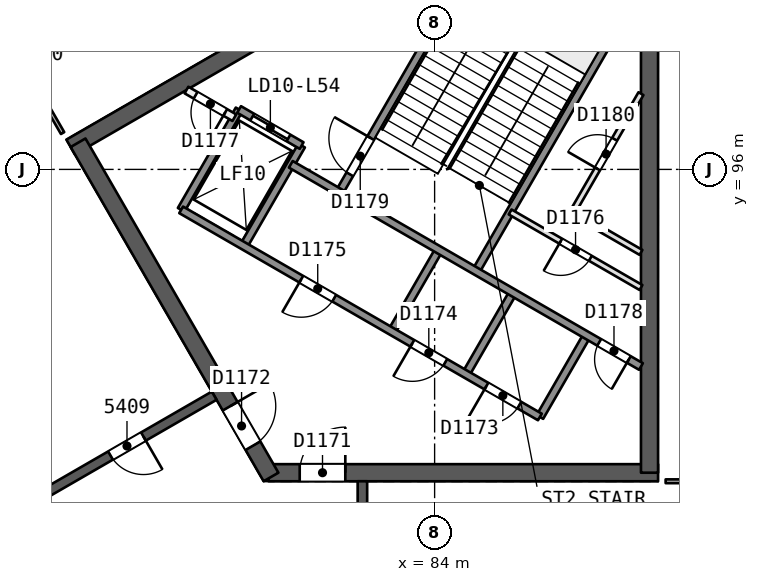
"""IFC4 building model, lengths in metres.
Left out: names, types, materials, properties, quantities, classifications, styles, units other than length and angle.
Written with IfcOpenShell. Run it as: python <this file> out.ifc"""

import sys

from ifc_helpers import new_model, si_unit, direction, frame, frame_2d, origin, place, context, subcontext, project, spatial, rectangle, extrude, element, fill, save


model = new_model("IFC4")
c1 = context("Model", 3, precision=1e-05, world=origin(), true_north=direction((0.0, 1.0)))
c2 = subcontext(c1, "Body", "Model", "MODEL_VIEW")
j1 = project(units=[si_unit("LENGTHUNIT", "METRE"), si_unit("PLANEANGLEUNIT", "RADIAN")], contexts=[c1])
p1 = place(None, origin())
s1 = spatial("IfcSite", under=j1, at=p1, CompositionType="ELEMENT")
p2 = place(p1, origin())
s2 = spatial("IfcBuilding", under=s1, at=p2, CompositionType="ELEMENT")
p3 = place(p2, frame((0.0, 0.0, 220.6)))
s3 = spatial("IfcBuildingStorey", under=s2, at=p3, CompositionType="ELEMENT", Elevation=220.6)
p4 = place(p3, frame((79.63, 88.019, 0.0), z_axis=(0.0, 0.0, 1.0), x_axis=(1.0, 0.0, 0.0)))
e1 = element("IfcWall", 1, at=p4, inside=s3, PredefinedType="SHEAR", context=c2, shape_type="SweptSolid", body=[
    extrude(rectangle(XDim=10.25, YDim=0.45, at=frame_2d((5.125, 0.0))), origin(), (0.0, 0.0, 1.0), 3.7),
])
p5 = place(p4, frame((0.82, 0.0, 0.0)))
e2 = element("IfcOpeningElement", 2, at=p5, cuts=e1, PredefinedType="OPENING", context=c2, shape_type="SweptSolid", body=[
    extrude(rectangle(XDim=1.2, YDim=2.1, at=frame_2d((0.6, 1.05))), frame((0.0, 0.235, 0.0), z_axis=(0.0, -1.0, 0.0), x_axis=(1.0, 0.0, 0.0)), (0.0, 0.0, 1.0), 0.471),
])
p6 = place(p3, frame((89.655, 88.019, 0.0), z_axis=(0.0, 0.0, 1.0), x_axis=(0.0, 1.0, 0.0)))
e3 = element("IfcWall", 3, at=p6, inside=s3, PredefinedType="SHEAR", context=c2, shape_type="SweptSolid", body=[
    extrude(rectangle(XDim=14.108, YDim=0.45, at=frame_2d((7.054, 0.0))), origin(), (0.0, 0.0, 1.0), 3.7),
])
p7 = place(p3, frame((86.723, 103.69, 0.0), z_axis=(0.0, 0.0, 1.0), x_axis=(-0.866022713978, -0.500004658852, 0.0)))
e4 = element("IfcWall", 4, at=p7, inside=s3, PredefinedType="SHEAR", context=c2, shape_type="SweptSolid", body=[
    extrude(rectangle(XDim=14.203, YDim=0.45, at=frame_2d((7.102, 0.0))), origin(), (0.0, 0.0, 1.0), 3.7),
])
p8 = place(p3, frame((74.617, 96.701, 0.0), z_axis=(0.0, 0.0, 1.0), x_axis=(0.499994385119, -0.866028645513, 0.0)))
e5 = element("IfcWall", 5, at=p8, inside=s3, PredefinedType="SHEAR", context=c2, shape_type="SweptSolid", body=[
    extrude(rectangle(XDim=10.155, YDim=0.45, at=frame_2d((5.077, 0.0))), origin(), (0.0, 0.0, 1.0), 3.7),
])
p9 = place(p8, frame((8.005, 0.0, 0.0)))
e6 = element("IfcOpeningElement", 6, at=p9, cuts=e5, PredefinedType="OPENING", context=c2, shape_type="SweptSolid", body=[
    extrude(rectangle(XDim=1.2, YDim=2.1, at=frame_2d((0.6, 1.05))), frame((0.0, 0.235, 0.0), z_axis=(0.0, -1.0, 0.0), x_axis=(1.0, 0.0, 0.0)), (0.0, 0.0, 1.0), 0.471),
])
p10 = place(p3, frame((82.1, 72.206, 0.0), z_axis=(0.0, 0.0, 1.0), x_axis=(0.0, 1.0, 0.0)))
e7 = element("IfcWall", 7, at=p10, inside=s3, PredefinedType="SHEAR", context=c2, shape_type="SweptSolid", body=[
    extrude(rectangle(XDim=15.588, YDim=0.25, at=frame_2d((7.794, 0.0))), origin(), (0.0, 0.0, 1.0), 3.3),
])
p11 = place(p10, frame((2.15, 0.0, 0.0)))
e8 = element("IfcOpeningElement", 8, at=p11, cuts=e7, PredefinedType="OPENING", context=c2, shape_type="SweptSolid", body=[
    extrude(rectangle(XDim=1.0, YDim=2.1, at=frame_2d((0.5, 1.05))), frame((0.0, 0.135, 0.0), z_axis=(0.0, -1.0, 0.0), x_axis=(1.0, 0.0, 0.0)), (0.0, 0.0, 1.0), 0.271),
])
p12 = place(p10, frame((8.75, 0.0, 0.0)))
e9 = element("IfcOpeningElement", 9, at=p12, cuts=e7, PredefinedType="OPENING", context=c2, shape_type="SweptSolid", body=[
    extrude(rectangle(XDim=1.0, YDim=2.1, at=frame_2d((0.5, 1.05))), frame((0.0, 0.135, 0.0), z_axis=(0.0, -1.0, 0.0), x_axis=(1.0, 0.0, 0.0)), (0.0, 0.0, 1.0), 0.271),
])
p13 = place(p10, frame((12.594, 0.0, 0.0)))
e10 = element("IfcOpeningElement", 10, at=p13, cuts=e7, PredefinedType="OPENING", context=c2, shape_type="SweptSolid", body=[
    extrude(rectangle(XDim=1.0, YDim=2.1, at=frame_2d((0.5, 1.05))), frame((0.0, 0.135, 0.0), z_axis=(0.0, -1.0, 0.0), x_axis=(1.0, 0.0, 0.0)), (0.0, 0.0, 1.0), 0.271),
])
p14 = place(p3, frame((78.2, 90.046, 0.0), z_axis=(0.0, 0.0, 1.0), x_axis=(-0.866026492143, -0.499998114903, 0.0)))
e11 = element("IfcWall", 11, at=p14, inside=s3, PredefinedType="SHEAR", context=c2, shape_type="SweptSolid", body=[
    extrude(rectangle(XDim=15.588, YDim=0.25, at=frame_2d((7.794, 0.0))), origin(), (0.0, 0.0, 1.0), 3.3),
])
p15 = place(p14, frame((2.15, 0.0, 0.0)))
e12 = element("IfcOpeningElement", 12, at=p15, cuts=e11, PredefinedType="OPENING", context=c2, shape_type="SweptSolid", body=[
    extrude(rectangle(XDim=1.0, YDim=2.1, at=frame_2d((0.5, 1.05))), frame((0.0, 0.135, 0.0), z_axis=(0.0, -1.0, 0.0), x_axis=(1.0, 0.0, 0.0)), (0.0, 0.0, 1.0), 0.271),
])
p16 = place(p14, frame((8.538, 0.0, 0.0)))
e13 = element("IfcOpeningElement", 13, at=p16, cuts=e11, PredefinedType="OPENING", context=c2, shape_type="SweptSolid", body=[
    extrude(rectangle(XDim=1.1, YDim=2.1, at=frame_2d((0.55, 1.05))), frame((0.0, 0.135, 0.0), z_axis=(0.0, -1.0, 0.0), x_axis=(1.0, 0.0, 0.0)), (0.0, 0.0, 1.0), 0.271),
])
p17 = place(p14, frame((12.282, 0.0, 0.0)))
e14 = element("IfcOpeningElement", 14, at=p17, cuts=e11, PredefinedType="OPENING", context=c2, shape_type="SweptSolid", body=[
    extrude(rectangle(XDim=1.0, YDim=2.1, at=frame_2d((0.5, 1.05))), frame((0.0, 0.135, 0.0), z_axis=(0.0, -1.0, 0.0), x_axis=(1.0, 0.0, 0.0)), (0.0, 0.0, 1.0), 0.271),
])
p18 = place(p3, frame((92.503, 87.794, 0.0), z_axis=(0.0, 0.0, 1.0), x_axis=(-1.0, 0.0, 0.0)))
e15 = element("IfcWall", 15, at=p18, inside=s3, PredefinedType="PARTITIONING", context=c2, shape_type="SweptSolid", body=[
    extrude(rectangle(XDim=2.424, YDim=0.1, at=frame_2d((1.212, 0.0))), origin(), (0.0, 0.0, 1.0), 3.3),
])
p19 = place(p18, frame((0.762, 0.0, 0.0)))
e16 = element("IfcOpeningElement", 16, at=p19, cuts=e15, PredefinedType="OPENING", context=c2, shape_type="SweptSolid", body=[
    extrude(rectangle(XDim=0.9, YDim=2.1, at=frame_2d((0.45, 1.05))), frame((0.0, 0.061, 0.0), z_axis=(0.0, -1.0, 0.0), x_axis=(1.0, 0.0, 0.0)), (0.0, 0.0, 1.0), 0.121),
])
p20 = place(p3, frame((74.21, 96.956, 0.0), z_axis=(0.0, 0.0, 1.0), x_axis=(-0.49995203611, 0.866053093978, 0.0)))
e17 = element("IfcWall", 17, at=p20, inside=s3, PredefinedType="PARTITIONING", context=c2, shape_type="SweptSolid", body=[
    extrude(rectangle(XDim=2.424, YDim=0.1, at=frame_2d((1.212, 0.0))), origin(), (0.0, 0.0, 1.0), 3.3),
])
p21 = place(p20, frame((0.762, 0.0, 0.0)))
e18 = element("IfcOpeningElement", 18, at=p21, cuts=e17, PredefinedType="OPENING", context=c2, shape_type="SweptSolid", body=[
    extrude(rectangle(XDim=0.9, YDim=2.1, at=frame_2d((0.45, 1.05))), frame((0.0, 0.061, 0.0), z_axis=(0.0, -1.0, 0.0), x_axis=(1.0, 0.0, 0.0)), (0.0, 0.0, 1.0), 0.121),
])
p22 = place(p3, frame((44.193, 82.596, 0.0), z_axis=(0.0, 0.0, 1.0), x_axis=(0.866024521231, 0.500001528624, 0.0)))
e19 = element("IfcWall", 19, at=p22, inside=s3, PredefinedType="SOLIDWALL", context=c2, shape_type="SweptSolid", body=[
    extrude(rectangle(XDim=50.762, YDim=0.3, at=frame_2d((25.381, 0.0))), origin(), (0.0, 0.0, 1.0), 3.3),
])
p23 = place(p22, frame((24.337, 0.0, 0.0)))
e20 = element("IfcOpeningElement", 20, at=p23, cuts=e19, PredefinedType="OPENING", context=c2, shape_type="SweptSolid", body=[
    extrude(rectangle(XDim=2.4, YDim=2.4, at=frame_2d((1.2, 1.2))), frame((0.0, 0.161, 0.0), z_axis=(0.0, -1.0, 0.0), x_axis=(1.0, 0.0, 0.0)), (0.0, 0.0, 1.0), 0.321),
])
p24 = place(p22, frame((29.325, 0.0, 0.0)))
e21 = element("IfcOpeningElement", 21, at=p24, cuts=e19, PredefinedType="OPENING", context=c2, shape_type="SweptSolid", body=[
    extrude(rectangle(XDim=2.4, YDim=2.4, at=frame_2d((1.2, 1.2))), frame((0.0, 0.161, 0.0), z_axis=(0.0, -1.0, 0.0), x_axis=(1.0, 0.0, 0.0)), (0.0, 0.0, 1.0), 0.321),
])
p25 = place(p22, frame((39.492, 0.0, 0.0)))
e22 = element("IfcOpeningElement", 22, at=p25, cuts=e19, PredefinedType="OPENING", context=c2, shape_type="SweptSolid", body=[
    extrude(rectangle(XDim=2.4, YDim=2.4, at=frame_2d((1.2, 1.2))), frame((0.0, 0.161, 0.0), z_axis=(0.0, -1.0, 0.0), x_axis=(1.0, 0.0, 0.0)), (0.0, 0.0, 1.0), 0.321),
])
p26 = place(p22, frame((19.193, 0.0, 0.0)))
e23 = element("IfcOpeningElement", 23, at=p26, cuts=e19, PredefinedType="OPENING", context=c2, shape_type="SweptSolid", body=[
    extrude(rectangle(XDim=2.4, YDim=2.4, at=frame_2d((1.2, 1.2))), frame((0.0, 0.161, 0.0), z_axis=(0.0, -1.0, 0.0), x_axis=(1.0, 0.0, 0.0)), (0.0, 0.0, 1.0), 0.321),
])
p27 = place(p22, frame((8.878, 0.0, 0.0)))
e24 = element("IfcOpeningElement", 24, at=p27, cuts=e19, PredefinedType="OPENING", context=c2, shape_type="SweptSolid", body=[
    extrude(rectangle(XDim=2.4, YDim=2.4, at=frame_2d((1.2, 1.2))), frame((0.0, 0.161, 0.0), z_axis=(0.0, -1.0, 0.0), x_axis=(1.0, 0.0, 0.0)), (0.0, 0.0, 1.0), 0.321),
])
p28 = place(p3, frame((86.77, 89.486, 0.0), z_axis=(0.0, 0.0, 1.0), x_axis=(0.499961042966, 0.86604789447, 0.0)))
e25 = element("IfcWall", 25, at=p28, inside=s3, PredefinedType="SOLIDWALL", context=c2, shape_type="SweptSolid", body=[
    extrude(rectangle(XDim=2.48, YDim=0.2, at=frame_2d((1.24, 0.0))), origin(), (0.0, 0.0, 1.0), 3.3),
])
p29 = place(p3, frame((87.621, 94.86, 0.0), z_axis=(0.0, 0.0, 1.0), x_axis=(0.499993116331, 0.866029378036, 0.0)))
e26 = element("IfcWall", 26, at=p29, inside=s3, PredefinedType="PARTITIONING", context=c2, shape_type="SweptSolid", body=[
    extrude(rectangle(XDim=3.618, YDim=0.15, at=frame_2d((1.809, 0.0))), origin(), (0.0, 0.0, 1.0), 3.3),
])
p30 = place(p29, frame((1.332, 0.0, 0.0)))
e27 = element("IfcOpeningElement", 27, at=p30, cuts=e26, PredefinedType="OPENING", context=c2, shape_type="SweptSolid", body=[
    extrude(rectangle(XDim=0.9, YDim=2.1, at=frame_2d((0.45, 1.05))), frame((0.0, 0.085, 0.0), z_axis=(0.0, -1.0, 0.0), x_axis=(1.0, 0.0, 0.0)), (0.0, 0.0, 1.0), 0.171),
])
p31 = place(p3, frame((84.821, 90.611, 0.0), z_axis=(0.0, 0.0, 1.0), x_axis=(0.499961042966, 0.86604789447, 0.0)))
e28 = element("IfcWall", 28, at=p31, inside=s3, PredefinedType="SOLIDWALL", context=c2, shape_type="SweptSolid", body=[
    extrude(rectangle(XDim=2.48, YDim=0.2, at=frame_2d((1.24, 0.0))), origin(), (0.0, 0.0, 1.0), 3.3),
])
p32 = place(p3, frame((85.087, 93.321, 0.0), z_axis=(0.0, 0.0, 1.0), x_axis=(0.500019787375, 0.866013979237, 0.0)))
e29 = element("IfcWall", 29, at=p32, inside=s3, PredefinedType="SOLIDWALL", context=c2, shape_type="SweptSolid", body=[
    extrude(rectangle(XDim=7.7, YDim=0.2, at=frame_2d((3.85, 0.0))), origin(), (0.0, 0.0, 1.0), 3.3),
])
p33 = place(p3, frame((82.873, 91.736, 0.0), z_axis=(0.0, 0.0, 1.0), x_axis=(0.499961042966, 0.86604789447, 0.0)))
e30 = element("IfcWall", 30, at=p33, inside=s3, PredefinedType="SOLIDWALL", context=c2, shape_type="SweptSolid", body=[
    extrude(rectangle(XDim=2.48, YDim=0.2, at=frame_2d((1.24, 0.0))), origin(), (0.0, 0.0, 1.0), 3.3),
])
p34 = place(p3, frame((81.493, 95.396, 0.0), z_axis=(0.0, 0.0, 1.0), x_axis=(0.500006057782, 0.866021906294, 0.0)))
e31 = element("IfcWall", 31, at=p34, inside=s3, PredefinedType="SOLIDWALL", context=c2, shape_type="SweptSolid", body=[
    extrude(rectangle(XDim=7.7, YDim=0.2, at=frame_2d((3.85, 0.0))), origin(), (0.0, 0.0, 1.0), 3.3),
])
p35 = place(p34, frame((0.55, 0.0, 0.0)))
e32 = element("IfcOpeningElement", 32, at=p35, cuts=e31, PredefinedType="OPENING", context=c2, shape_type="SweptSolid", body=[
    extrude(rectangle(XDim=1.1, YDim=2.1, at=frame_2d((0.55, 1.05))), frame((0.0, 0.11, 0.0), z_axis=(0.0, -1.0, 0.0), x_axis=(1.0, 0.0, 0.0)), (0.0, 0.0, 1.0), 0.221),
])
for number, where, z_axis, x_axis in (
    (33, (78.976, 93.986, 0.0), (0.0, 0.0, 1.0), (0.5, 0.866, 0.0)),
    (34, (77.33, 94.936, 0.0), (0.0, 0.0, 1.0), (0.5, 0.866, 0.0)),
):
    element("IfcWall", number, at=place(p3, frame(where, z_axis=z_axis, x_axis=x_axis)), inside=s3, PredefinedType="SOLIDWALL", context=c2, shape_type="SweptSolid", body=[
        extrude(rectangle(XDim=3.05, YDim=0.2, at=frame_2d((1.525, 0.0))), origin(), (0.0, 0.0, 1.0), 3.3),
    ])
p36 = place(p3, frame((86.77, 89.486, 0.0), z_axis=(0.0, 0.0, 1.0), x_axis=(-0.86601811187, 0.500012629753, 0.0)))
e35 = element("IfcWall", 35, at=p36, inside=s3, PredefinedType="SOLIDWALL", context=c2, shape_type="SweptSolid", body=[
    extrude(rectangle(XDim=10.9, YDim=0.2, at=frame_2d((5.45, 0.0))), origin(), (0.0, 0.0, 1.0), 3.3),
])
p37 = place(p36, frame((0.625, 0.0, 0.0)))
e36 = element("IfcOpeningElement", 36, at=p37, cuts=e35, PredefinedType="OPENING", context=c2, shape_type="SweptSolid", body=[
    extrude(rectangle(XDim=1.0, YDim=2.1, at=frame_2d((0.5, 1.05))), frame((0.0, 0.11, 0.0), z_axis=(0.0, -1.0, 0.0), x_axis=(1.0, 0.0, 0.0)), (0.0, 0.0, 1.0), 0.221),
])
p38 = place(p36, frame((2.875, 0.0, 0.0)))
e37 = element("IfcOpeningElement", 37, at=p38, cuts=e35, PredefinedType="OPENING", context=c2, shape_type="SweptSolid", body=[
    extrude(rectangle(XDim=1.0, YDim=2.1, at=frame_2d((0.5, 1.05))), frame((0.0, 0.11, 0.0), z_axis=(0.0, -1.0, 0.0), x_axis=(1.0, 0.0, 0.0)), (0.0, 0.0, 1.0), 0.221),
])
p39 = place(p36, frame((6.25, 0.0, 0.0)))
e38 = element("IfcOpeningElement", 38, at=p39, cuts=e35, PredefinedType="OPENING", context=c2, shape_type="SweptSolid", body=[
    extrude(rectangle(XDim=1.0, YDim=2.1, at=frame_2d((0.5, 1.05))), frame((0.0, 0.11, 0.0), z_axis=(0.0, -1.0, 0.0), x_axis=(1.0, 0.0, 0.0)), (0.0, 0.0, 1.0), 0.221),
])
p40 = place(p3, frame((89.43, 90.814, 0.0), z_axis=(0.0, 0.0, 1.0), x_axis=(-0.866018983788, 0.500011119594, 0.0)))
e39 = element("IfcWall", 39, at=p40, inside=s3, PredefinedType="SOLIDWALL", context=c2, shape_type="SweptSolid", body=[
    extrude(rectangle(XDim=10.64, YDim=0.2, at=frame_2d((5.32, 0.0))), origin(), (0.0, 0.0, 1.0), 3.3),
])
p41 = place(p40, frame((0.37, 0.0, 0.0)))
e40 = element("IfcOpeningElement", 40, at=p41, cuts=e39, PredefinedType="OPENING", context=c2, shape_type="SweptSolid", body=[
    extrude(rectangle(XDim=0.9, YDim=2.1, at=frame_2d((0.45, 1.05))), frame((0.0, 0.11, 0.0), z_axis=(0.0, -1.0, 0.0), x_axis=(1.0, 0.0, 0.0)), (0.0, 0.0, 1.0), 0.221),
])
p42 = place(p3, frame((78.73, 97.361, 0.0), z_axis=(0.0, 0.0, 1.0), x_axis=(-0.866045896294, 0.499964504253, 0.0)))
e41 = element("IfcWall", 41, at=p42, inside=s3, PredefinedType="PARTITIONING", context=c2, shape_type="SweptSolid", body=[
    extrude(rectangle(XDim=1.455, YDim=0.2, at=frame_2d((0.728, 0.0))), origin(), (0.0, 0.0, 1.0), 3.3),
])
p43 = place(p42, frame((0.278, 0.0, 0.0)))
e42 = element("IfcOpeningElement", 42, at=p43, cuts=e41, PredefinedType="OPENING", context=c2, shape_type="SweptSolid", body=[
    extrude(rectangle(XDim=0.9, YDim=2.1, at=frame_2d((0.45, 1.05))), frame((0.0, 0.11, 0.0), z_axis=(0.0, -1.0, 0.0), x_axis=(1.0, 0.0, 0.0)), (0.0, 0.0, 1.0), 0.221),
])
p44 = place(p3, frame((80.5, 96.627, 0.0), z_axis=(0.0, 0.0, 1.0), x_axis=(-0.86601224135, 0.500022797313, 0.0)))
e43 = element("IfcWall", 43, at=p44, inside=s3, PredefinedType="SOLIDWALL", context=c2, shape_type="SweptSolid", body=[
    extrude(rectangle(XDim=1.9, YDim=0.2, at=frame_2d((0.95, 0.0))), origin(), (0.0, 0.0, 1.0), 3.3),
])
p45 = place(p44, frame((0.4, 0.0, 0.0)))
e44 = element("IfcOpeningElement", 44, at=p45, cuts=e43, PredefinedType="OPENING", context=c2, shape_type="SweptSolid", body=[
    extrude(rectangle(XDim=1.1, YDim=2.1, at=frame_2d((0.55, 1.05))), frame((0.0, 0.11, 0.0), z_axis=(0.0, -1.0, 0.0), x_axis=(1.0, 0.0, 0.0)), (0.0, 0.0, 1.0), 0.221),
])
p46 = place(p3, frame((89.43, 92.892, 0.0), z_axis=(0.0, 0.0, 1.0), x_axis=(-0.866019912421, 0.500009511199, 0.0)))
e45 = element("IfcWall", 45, at=p46, inside=s3, PredefinedType="PARTITIONING", context=c2, shape_type="SweptSolid", body=[
    extrude(rectangle(XDim=3.976, YDim=0.15, at=frame_2d((1.988, 0.0))), origin(), (0.0, 0.0, 1.0), 3.3),
])
p47 = place(p46, frame((1.538, 0.0, 0.0)))
e46 = element("IfcOpeningElement", 46, at=p47, cuts=e45, PredefinedType="OPENING", context=c2, shape_type="SweptSolid", body=[
    extrude(rectangle(XDim=0.9, YDim=2.1, at=frame_2d((0.45, 1.05))), frame((0.0, 0.085, 0.0), z_axis=(0.0, -1.0, 0.0), x_axis=(1.0, 0.0, 0.0)), (0.0, 0.0, 1.0), 0.171),
])
p48 = place(p3, frame((89.43, 93.816, 0.0), z_axis=(0.0, 0.0, 1.0), x_axis=(-0.866004557827, 0.500036104519, 0.0)))
e47 = element("IfcWall", 47, at=p48, inside=s3, PredefinedType="PARTITIONING", context=c2, shape_type="SweptSolid", body=[
    extrude(rectangle(XDim=2.089, YDim=0.15, at=frame_2d((1.044, 0.0))), origin(), (0.0, 0.0, 1.0), 3.3),
])
p49 = place(p15, origin())
e48 = element("IfcDoor", 48, at=p49, inside=s3, OperationType="SINGLE_SWING_LEFT", PredefinedType="NOTDEFINED", context=c2, shape_type="SweptSolid", body=[
    extrude(rectangle(XDim=1.0, YDim=2.1, at=frame_2d((0.5, 1.05))), frame((0.0, 0.025, 0.0), z_axis=(0.0, -1.0, 0.0), x_axis=(1.0, 0.0, 0.0)), (0.0, 0.0, 1.0), 0.05),
])
fill(e12, e48)
p50 = place(p5, origin())
e49 = element("IfcDoor", 49, at=p50, inside=s3, OperationType="SINGLE_SWING_RIGHT", PredefinedType="NOTDEFINED", context=c2, shape_type="SweptSolid", body=[
    extrude(rectangle(XDim=1.2, YDim=2.1, at=frame_2d((0.6, 1.05))), frame((0.0, 0.025, 0.0), z_axis=(0.0, -1.0, 0.0), x_axis=(1.0, 0.0, 0.0)), (0.0, 0.0, 1.0), 0.05),
])
fill(e2, e49)
p51 = place(p9, origin())
e50 = element("IfcDoor", 50, at=p51, inside=s3, OperationType="SINGLE_SWING_LEFT", PredefinedType="NOTDEFINED", context=c2, shape_type="SweptSolid", body=[
    extrude(rectangle(XDim=1.2, YDim=2.1, at=frame_2d((0.6, 1.05))), frame((0.0, 0.025, 0.0), z_axis=(0.0, -1.0, 0.0), x_axis=(1.0, 0.0, 0.0)), (0.0, 0.0, 1.0), 0.05),
])
fill(e6, e50)
p52 = place(p45, origin())
e51 = element("IfcDoor", 51, at=p52, inside=s3, OperationType="SLIDING_TO_RIGHT", PredefinedType="NOTDEFINED", context=c2, shape_type="SweptSolid", body=[
    extrude(rectangle(XDim=1.1, YDim=2.1, at=frame_2d((0.55, 1.05))), frame((0.0, 0.025, 0.0), z_axis=(0.0, -1.0, 0.0), x_axis=(1.0, 0.0, 0.0)), (0.0, 0.0, 1.0), 0.05),
])
fill(e44, e51)
p53 = place(p37, origin())
e52 = element("IfcDoor", 52, at=p53, inside=s3, OperationType="SINGLE_SWING_RIGHT", PredefinedType="NOTDEFINED", context=c2, shape_type="SweptSolid", body=[
    extrude(rectangle(XDim=1.0, YDim=2.1, at=frame_2d((0.5, 1.05))), frame((0.0, 0.025, 0.0), z_axis=(0.0, -1.0, 0.0), x_axis=(1.0, 0.0, 0.0)), (0.0, 0.0, 1.0), 0.05),
])
fill(e36, e52)
p54 = place(p38, origin())
e53 = element("IfcDoor", 53, at=p54, inside=s3, OperationType="SINGLE_SWING_RIGHT", PredefinedType="NOTDEFINED", context=c2, shape_type="SweptSolid", body=[
    extrude(rectangle(XDim=1.0, YDim=2.1, at=frame_2d((0.5, 1.05))), frame((0.0, 0.025, 0.0), z_axis=(0.0, -1.0, 0.0), x_axis=(1.0, 0.0, 0.0)), (0.0, 0.0, 1.0), 0.05),
])
fill(e37, e53)
p55 = place(p39, origin())
e54 = element("IfcDoor", 54, at=p55, inside=s3, OperationType="SINGLE_SWING_RIGHT", PredefinedType="NOTDEFINED", context=c2, shape_type="SweptSolid", body=[
    extrude(rectangle(XDim=1.0, YDim=2.1, at=frame_2d((0.5, 1.05))), frame((0.0, 0.025, 0.0), z_axis=(0.0, -1.0, 0.0), x_axis=(1.0, 0.0, 0.0)), (0.0, 0.0, 1.0), 0.05),
])
fill(e38, e54)
p56 = place(p47, origin())
e55 = element("IfcDoor", 55, at=p56, inside=s3, OperationType="SINGLE_SWING_RIGHT", PredefinedType="NOTDEFINED", context=c2, shape_type="SweptSolid", body=[
    extrude(rectangle(XDim=0.9, YDim=2.1, at=frame_2d((0.45, 1.05))), frame((0.0, 0.025, 0.0), z_axis=(0.0, -1.0, 0.0), x_axis=(1.0, 0.0, 0.0)), (0.0, 0.0, 1.0), 0.05),
])
fill(e46, e55)
p57 = place(p43, origin())
e56 = element("IfcDoor", 56, at=p57, inside=s3, OperationType="SINGLE_SWING_LEFT", PredefinedType="NOTDEFINED", context=c2, shape_type="SweptSolid", body=[
    extrude(rectangle(XDim=0.9, YDim=2.1, at=frame_2d((0.45, 1.05))), frame((0.0, 0.025, 0.0), z_axis=(0.0, -1.0, 0.0), x_axis=(1.0, 0.0, 0.0)), (0.0, 0.0, 1.0), 0.05),
])
fill(e42, e56)
p58 = place(p41, origin())
e57 = element("IfcDoor", 57, at=p58, inside=s3, OperationType="SINGLE_SWING_LEFT", PredefinedType="NOTDEFINED", context=c2, shape_type="SweptSolid", body=[
    extrude(rectangle(XDim=0.9, YDim=2.1, at=frame_2d((0.45, 1.05))), frame((0.0, 0.025, 0.0), z_axis=(0.0, -1.0, 0.0), x_axis=(1.0, 0.0, 0.0)), (0.0, 0.0, 1.0), 0.05),
])
fill(e40, e57)
p59 = place(p35, origin())
e58 = element("IfcDoor", 58, at=p59, inside=s3, OperationType="SINGLE_SWING_RIGHT", PredefinedType="NOTDEFINED", context=c2, shape_type="SweptSolid", body=[
    extrude(rectangle(XDim=1.1, YDim=2.1, at=frame_2d((0.55, 1.05))), frame((0.0, 0.025, 0.0), z_axis=(0.0, -1.0, 0.0), x_axis=(1.0, 0.0, 0.0)), (0.0, 0.0, 1.0), 0.05),
])
fill(e32, e58)
p60 = place(p30, origin())
e59 = element("IfcDoor", 59, at=p60, inside=s3, OperationType="SINGLE_SWING_LEFT", PredefinedType="NOTDEFINED", context=c2, shape_type="SweptSolid", body=[
    extrude(rectangle(XDim=0.9, YDim=2.1, at=frame_2d((0.45, 1.05))), frame((0.0, 0.025, 0.0), z_axis=(0.0, -1.0, 0.0), x_axis=(1.0, 0.0, 0.0)), (0.0, 0.0, 1.0), 0.05),
])
fill(e27, e59)
save(model, sys.argv[1])
